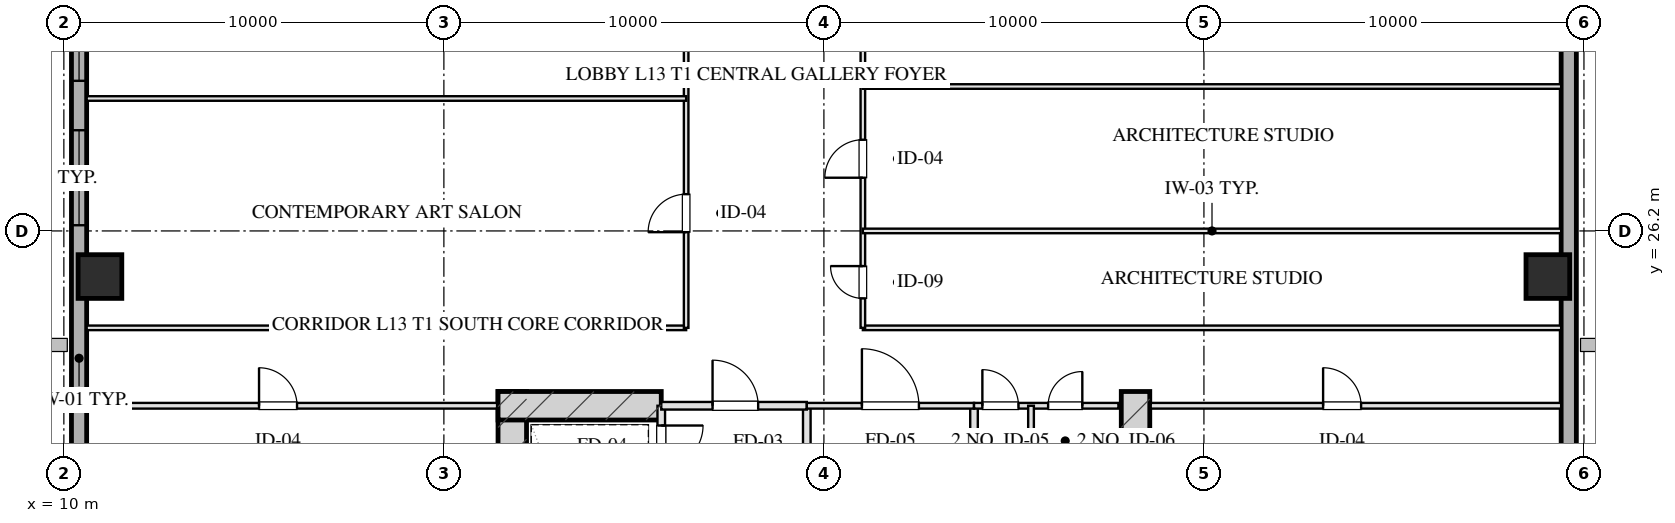
"""IFC4 building model, lengths in metres.
Left out: names, types, materials, properties, quantities, classifications, styles, units other than length and angle.
Written with IfcOpenShell. Run it as: python <this file> out.ifc"""

import sys

from ifc_helpers import new_model, si_unit, direction, frame, frame_2d, origin, origin_2d, place, context, subcontext, project, spatial, rectangle, hollow_rectangle, extrude, element, fill, save


model = new_model("IFC4")
c1 = context("Model", 3, precision=1e-05, world=origin(), true_north=direction((0.0, 1.0)))
c2 = subcontext(c1, "Body", "Model", "MODEL_VIEW")
j1 = project(units=[si_unit("LENGTHUNIT", "METRE"), si_unit("PLANEANGLEUNIT", "RADIAN")], contexts=[c1])
p1 = place(None, origin())
s1 = spatial("IfcSite", under=j1, at=p1, CompositionType="ELEMENT")
p2 = place(p1, origin())
s2 = spatial("IfcBuilding", under=s1, at=p2, CompositionType="ELEMENT")
p3 = place(p2, frame((0.0, 0.0, 57.5)))
s3 = spatial("IfcBuildingStorey", under=s2, at=p3, CompositionType="ELEMENT", Elevation=57.5)
for number, where, z_axis, x_axis in (
    (1, (21.8, 21.975, 0.0), (0.0, 0.0, 1.0), (0.0, -1.0, 0.0)),
    (2, (38.2, 21.975, 0.0), (0.0, 0.0, 1.0), (0.0, -1.0, 0.0)),
):
    element("IfcWall", number, at=place(p3, frame(where, z_axis=z_axis, x_axis=x_axis)), inside=s3, PredefinedType="SHEAR", context=c2, shape_type="SweptSolid", body=[
        extrude(rectangle(XDim=9.63, YDim=0.75, at=frame_2d((4.815, 0.0))), origin(), (0.0, 0.0, 1.0), 3.45),
    ])
p4 = place(p3, frame((21.425, 21.6, 0.0), z_axis=(0.0, 0.0, 1.0), x_axis=(1.0, 0.0, 0.0)))
e3 = element("IfcWall", 3, at=p4, inside=s3, PredefinedType="SHEAR", context=c2, shape_type="SweptSolid", body=[
    extrude(rectangle(XDim=4.295, YDim=0.75, at=frame_2d((2.147, 0.0))), origin(), (0.0, 0.0, 1.0), 3.45),
])
for number, where, z_axis, x_axis in (
    (4, (10.95, 25.0, 0.0), (0.0, 0.0, 1.0), (1.0, 0.0, 0.0)),
    (5, (49.05, 25.0, 0.0), (0.0, 0.0, 1.0), (1.0, 0.0, 0.0)),
):
    element("IfcColumn", number, at=place(p3, frame(where, z_axis=z_axis, x_axis=x_axis)), inside=s3, PredefinedType="COLUMN", context=c2, shape_type="SweptSolid", body=[
        extrude(hollow_rectangle(XDim=1.15, YDim=1.15, WallThickness=0.04, at=origin_2d()), origin(), (0.0, 0.0, 1.0), 3.451),
    ])
p5 = place(p3, frame((10.4, 7.2, 0.0), z_axis=(0.0, 0.0, 1.0), x_axis=(0.0, 1.0, 0.0)))
e6 = element("IfcWall", 6, at=p5, inside=s3, PredefinedType="SOLIDWALL", context=c2, shape_type="SweptSolid", body=[
    extrude(rectangle(XDim=53.6, YDim=0.4, at=frame_2d((26.8, 0.0))), origin(), (0.0, 0.0, 1.0), 2.61),
])
p6 = place(p5, frame((19.15, 0.0, 0.75)))
e7 = element("IfcOpeningElement", 7, at=p6, cuts=e6, PredefinedType="OPENING", context=c2, shape_type="SweptSolid", body=[
    extrude(rectangle(XDim=2.5, YDim=1.46, at=frame_2d((1.25, 0.73))), frame((0.0, 0.21, 0.0), z_axis=(0.0, -1.0, 0.0), x_axis=(1.0, 0.0, 0.0)), (0.0, 0.0, 1.0), 0.42),
])
p7 = place(p5, frame((22.95, 0.0, 0.75)))
e8 = element("IfcOpeningElement", 8, at=p7, cuts=e6, PredefinedType="OPENING", context=c2, shape_type="SweptSolid", body=[
    extrude(rectangle(XDim=2.5, YDim=1.46, at=frame_2d((1.25, 0.73))), frame((0.0, 0.21, 0.0), z_axis=(0.0, -1.0, 0.0), x_axis=(1.0, 0.0, 0.0)), (0.0, 0.0, 1.0), 0.42),
])
p8 = place(p5, frame((32.05, 0.0, 0.0)))
e9 = element("IfcOpeningElement", 9, at=p8, cuts=e6, PredefinedType="OPENING", context=c2, shape_type="SweptSolid", body=[
    extrude(rectangle(XDim=1.1, YDim=2.15, at=frame_2d((0.55, 1.075))), frame((0.0, 0.21, 0.0), z_axis=(0.0, -1.0, 0.0), x_axis=(1.0, 0.0, 0.0)), (0.0, 0.0, 1.0), 0.42),
])
p9 = place(p3, frame((49.6, 60.8, 0.0), z_axis=(0.0, 0.0, 1.0), x_axis=(0.0, -1.0, 0.0)))
e10 = element("IfcWall", 10, at=p9, inside=s3, PredefinedType="SOLIDWALL", context=c2, shape_type="SweptSolid", body=[
    extrude(rectangle(XDim=53.6, YDim=0.4, at=frame_2d((26.8, 0.0))), origin(), (0.0, 0.0, 1.0), 2.61),
])
p10 = place(p9, frame((23.177, 0.0, 0.0)))
e11 = element("IfcOpeningElement", 11, at=p10, cuts=e10, PredefinedType="OPENING", context=c2, shape_type="SweptSolid", body=[
    extrude(rectangle(XDim=1.1, YDim=2.15, at=frame_2d((0.55, 1.075))), frame((0.0, 0.21, 0.0), z_axis=(0.0, -1.0, 0.0), x_axis=(1.0, 0.0, 0.0)), (0.0, 0.0, 1.0), 0.42),
])
p11 = place(p3, frame((25.72, 21.6, 0.0), z_axis=(0.0, 0.0, 1.0), x_axis=(0.0, -1.0, 0.0)))
e12 = element("IfcWall", 12, at=p11, inside=s3, PredefinedType="PARTITIONING", context=c2, shape_type="SweptSolid", body=[
    extrude(rectangle(XDim=1.9, YDim=0.2, at=frame_2d((0.95, 0.0))), origin(), (0.0, 0.0, 1.0), 3.175),
])
p12 = place(p11, frame((0.52, 0.0, 0.0)))
e13 = element("IfcOpeningElement", 13, at=p12, cuts=e12, PredefinedType="OPENING", context=c2, shape_type="SweptSolid", body=[
    extrude(rectangle(XDim=1.1, YDim=2.05, at=frame_2d((0.55, 1.025))), frame((0.0, 0.11, 0.0), z_axis=(0.0, -1.0, 0.0), x_axis=(1.0, 0.0, 0.0)), (0.0, 0.0, 1.0), 0.22),
])
p13 = place(p3, frame((29.55, 21.6, 0.0), z_axis=(0.0, 0.0, 1.0), x_axis=(0.0, -1.0, 0.0)))
e14 = element("IfcWall", 14, at=p13, inside=s3, PredefinedType="PARTITIONING", context=c2, shape_type="SweptSolid", body=[
    extrude(rectangle(XDim=8.43, YDim=0.2, at=frame_2d((4.215, 0.0))), origin(), (0.0, 0.0, 1.0), 3.175),
])
p14 = place(p3, frame((25.72, 21.6, 0.0), z_axis=(0.0, 0.0, 1.0), x_axis=(1.0, 0.0, 0.0)))
e15 = element("IfcWall", 15, at=p14, inside=s3, PredefinedType="PARTITIONING", context=c2, shape_type="SweptSolid", body=[
    extrude(rectangle(XDim=3.83, YDim=0.2, at=frame_2d((1.915, 0.0))), origin(), (0.0, 0.0, 1.0), 3.175),
])
p15 = place(p14, frame((1.35, 0.0, 0.0)))
e16 = element("IfcOpeningElement", 16, at=p15, cuts=e15, PredefinedType="OPENING", context=c2, shape_type="SweptSolid", body=[
    extrude(rectangle(XDim=1.2, YDim=2.05, at=frame_2d((0.6, 1.025))), frame((0.0, 0.11, 0.0), z_axis=(0.0, -1.0, 0.0), x_axis=(1.0, 0.0, 0.0)), (0.0, 0.0, 1.0), 0.22),
])
p16 = place(p3, frame((33.95, 21.6, 0.0), z_axis=(0.0, 0.0, 1.0), x_axis=(0.0, -1.0, 0.0)))
e17 = element("IfcWall", 17, at=p16, inside=s3, PredefinedType="PARTITIONING", context=c2, shape_type="SweptSolid", body=[
    extrude(rectangle(XDim=8.43, YDim=0.2, at=frame_2d((4.215, 0.0))), origin(), (0.0, 0.0, 1.0), 3.175),
])
p17 = place(p3, frame((29.55, 21.6, 0.0), z_axis=(0.0, 0.0, 1.0), x_axis=(1.0, 0.0, 0.0)))
e18 = element("IfcWall", 18, at=p17, inside=s3, PredefinedType="PARTITIONING", context=c2, shape_type="SweptSolid", body=[
    extrude(rectangle(XDim=4.4, YDim=0.15, at=frame_2d((2.2, 0.0))), origin(), (0.0, 0.0, 1.0), 3.175),
])
p18 = place(p17, frame((1.45, 0.0, 0.0)))
e19 = element("IfcOpeningElement", 19, at=p18, cuts=e18, PredefinedType="OPENING", context=c2, shape_type="SweptSolid", body=[
    extrude(rectangle(XDim=1.5, YDim=2.05, at=frame_2d((0.75, 1.025))), frame((0.0, 0.085, 0.0), z_axis=(0.0, -1.0, 0.0), x_axis=(1.0, 0.0, 0.0)), (0.0, 0.0, 1.0), 0.17),
])
p19 = place(p3, frame((33.95, 21.6, 0.0), z_axis=(0.0, 0.0, 1.0), x_axis=(1.0, 0.0, 0.0)))
e20 = element("IfcWall", 20, at=p19, inside=s3, PredefinedType="PARTITIONING", context=c2, shape_type="SweptSolid", body=[
    extrude(rectangle(XDim=3.8, YDim=0.15, at=frame_2d((1.9, 0.0))), origin(), (0.0, 0.0, 1.0), 3.175),
])
p20 = place(p19, frame((0.22, 0.0, 0.0)))
e21 = element("IfcOpeningElement", 21, at=p20, cuts=e20, PredefinedType="OPENING", context=c2, shape_type="SweptSolid", body=[
    extrude(rectangle(XDim=0.95, YDim=2.05, at=frame_2d((0.475, 1.025))), frame((0.0, 0.085, 0.0), z_axis=(0.0, -1.0, 0.0), x_axis=(1.0, 0.0, 0.0)), (0.0, 0.0, 1.0), 0.17),
])
p21 = place(p19, frame((1.95, 0.0, 0.0)))
e22 = element("IfcOpeningElement", 22, at=p21, cuts=e20, PredefinedType="OPENING", context=c2, shape_type="SweptSolid", body=[
    extrude(rectangle(XDim=0.9, YDim=2.05, at=frame_2d((0.45, 1.025))), frame((0.0, 0.085, 0.0), z_axis=(0.0, -1.0, 0.0), x_axis=(1.0, 0.0, 0.0)), (0.0, 0.0, 1.0), 0.17),
])
p22 = place(p3, frame((35.45, 21.6, 0.0), z_axis=(0.0, 0.0, 1.0), x_axis=(0.0, -1.0, 0.0)))
e23 = element("IfcWall", 23, at=p22, inside=s3, PredefinedType="PARTITIONING", context=c2, shape_type="SweptSolid", body=[
    extrude(rectangle(XDim=8.43, YDim=0.15, at=frame_2d((4.215, 0.0))), origin(), (0.0, 0.0, 1.0), 2.815),
])
p23 = place(p22, frame((2.55, 0.0, 0.0)))
e24 = element("IfcOpeningElement", 24, at=p23, cuts=e23, PredefinedType="OPENING", context=c2, shape_type="SweptSolid", body=[
    extrude(rectangle(XDim=0.95, YDim=2.05, at=frame_2d((0.475, 1.025))), frame((0.0, 0.085, 0.0), z_axis=(0.0, -1.0, 0.0), x_axis=(1.0, 0.0, 0.0)), (0.0, 0.0, 1.0), 0.17),
])
p24 = place(p22, frame((5.6, 0.0, 0.0)))
e25 = element("IfcOpeningElement", 25, at=p24, cuts=e23, PredefinedType="OPENING", context=c2, shape_type="SweptSolid", body=[
    extrude(rectangle(XDim=0.9, YDim=2.05, at=frame_2d((0.45, 1.025))), frame((0.0, 0.085, 0.0), z_axis=(0.0, -1.0, 0.0), x_axis=(1.0, 0.0, 0.0)), (0.0, 0.0, 1.0), 0.17),
])
p25 = place(p3, frame((10.6, 21.6, 0.0), z_axis=(0.0, 0.0, 1.0), x_axis=(1.0, 0.0, 0.0)))
e26 = element("IfcWall", 26, at=p25, inside=s3, PredefinedType="PARTITIONING", context=c2, shape_type="SweptSolid", body=[
    extrude(rectangle(XDim=10.8, YDim=0.15, at=frame_2d((5.4, 0.0))), origin(), (0.0, 0.0, 1.0), 3.175),
])
p26 = place(p25, frame((4.536, 0.0, 0.0)))
e27 = element("IfcOpeningElement", 27, at=p26, cuts=e26, PredefinedType="OPENING", context=c2, shape_type="SweptSolid", body=[
    extrude(rectangle(XDim=1.0, YDim=2.05, at=frame_2d((0.5, 1.025))), frame((0.0, 0.085, 0.0), z_axis=(0.0, -1.0, 0.0), x_axis=(1.0, 0.0, 0.0)), (0.0, 0.0, 1.0), 0.17),
])
p27 = place(p3, frame((38.6, 21.6, 0.0), z_axis=(0.0, 0.0, 1.0), x_axis=(1.0, 0.0, 0.0)))
e28 = element("IfcWall", 28, at=p27, inside=s3, PredefinedType="PARTITIONING", context=c2, shape_type="SweptSolid", body=[
    extrude(rectangle(XDim=10.8, YDim=0.15, at=frame_2d((5.4, 0.0))), origin(), (0.0, 0.0, 1.0), 3.175),
])
p28 = place(p27, frame((4.536, 0.0, 0.0)))
e29 = element("IfcOpeningElement", 29, at=p28, cuts=e28, PredefinedType="OPENING", context=c2, shape_type="SweptSolid", body=[
    extrude(rectangle(XDim=1.0, YDim=2.05, at=frame_2d((0.5, 1.025))), frame((0.0, 0.085, 0.0), z_axis=(0.0, -1.0, 0.0), x_axis=(1.0, 0.0, 0.0)), (0.0, 0.0, 1.0), 0.17),
])
p29 = place(p3, frame((10.6, 23.65, 0.0), z_axis=(0.0, 0.0, 1.0), x_axis=(1.0, 0.0, 0.0)))
e30 = element("IfcWall", 30, at=p29, inside=s3, PredefinedType="PARTITIONING", context=c2, shape_type="SweptSolid", body=[
    extrude(rectangle(XDim=15.775, YDim=0.12, at=frame_2d((7.887, 0.0))), origin(), (0.0, 0.0, 1.0), 3.175),
])
p30 = place(p3, frame((31.025, 23.65, 0.0), z_axis=(0.0, 0.0, 1.0), x_axis=(1.0, 0.0, 0.0)))
e31 = element("IfcWall", 31, at=p30, inside=s3, PredefinedType="PARTITIONING", context=c2, shape_type="SweptSolid", body=[
    extrude(rectangle(XDim=18.375, YDim=0.12, at=frame_2d((9.188, 0.0))), origin(), (0.0, 0.0, 1.0), 3.175),
])
p31 = place(p3, frame((26.375, 23.65, 0.0), z_axis=(0.0, 0.0, 1.0), x_axis=(0.0, 1.0, 0.0)))
e32 = element("IfcWall", 32, at=p31, inside=s3, PredefinedType="PARTITIONING", context=c2, shape_type="SweptSolid", body=[
    extrude(rectangle(XDim=20.7, YDim=0.12, at=frame_2d((10.35, 0.0))), origin(), (0.0, 0.0, 1.0), 3.175),
])
p32 = place(p31, frame((2.518, 0.0, 0.0)))
e33 = element("IfcOpeningElement", 33, at=p32, cuts=e32, PredefinedType="OPENING", context=c2, shape_type="SweptSolid", body=[
    extrude(rectangle(XDim=1.0, YDim=2.05, at=frame_2d((0.5, 1.025))), frame((0.0, 0.07, 0.0), z_axis=(0.0, -1.0, 0.0), x_axis=(1.0, 0.0, 0.0)), (0.0, 0.0, 1.0), 0.14),
])
p33 = place(p31, frame((9.692, 0.0, 0.0)))
e34 = element("IfcOpeningElement", 34, at=p33, cuts=e32, PredefinedType="OPENING", context=c2, shape_type="SweptSolid", body=[
    extrude(rectangle(XDim=1.0, YDim=2.05, at=frame_2d((0.5, 1.025))), frame((0.0, 0.07, 0.0), z_axis=(0.0, -1.0, 0.0), x_axis=(1.0, 0.0, 0.0)), (0.0, 0.0, 1.0), 0.14),
])
p34 = place(p31, frame((17.025, 0.0, 0.0)))
e35 = element("IfcOpeningElement", 35, at=p34, cuts=e32, PredefinedType="OPENING", context=c2, shape_type="SweptSolid", body=[
    extrude(rectangle(XDim=1.0, YDim=2.05, at=frame_2d((0.5, 1.025))), frame((0.0, 0.07, 0.0), z_axis=(0.0, -1.0, 0.0), x_axis=(1.0, 0.0, 0.0)), (0.0, 0.0, 1.0), 0.14),
])
p35 = place(p3, frame((31.025, 23.65, 0.0), z_axis=(0.0, 0.0, 1.0), x_axis=(0.0, 1.0, 0.0)))
e36 = element("IfcWall", 36, at=p35, inside=s3, PredefinedType="PARTITIONING", context=c2, shape_type="SweptSolid", body=[
    extrude(rectangle(XDim=20.7, YDim=0.12, at=frame_2d((10.35, 0.0))), origin(), (0.0, 0.0, 1.0), 3.175),
])
p36 = place(p35, frame((0.775, 0.0, 0.0)))
e37 = element("IfcOpeningElement", 37, at=p36, cuts=e36, PredefinedType="OPENING", context=c2, shape_type="SweptSolid", body=[
    extrude(rectangle(XDim=0.85, YDim=2.05, at=frame_2d((0.425, 1.025))), frame((0.0, 0.07, 0.0), z_axis=(0.0, -1.0, 0.0), x_axis=(1.0, 0.0, 0.0)), (0.0, 0.0, 1.0), 0.14),
])
p37 = place(p35, frame((3.95, 0.0, 0.0)))
e38 = element("IfcOpeningElement", 38, at=p37, cuts=e36, PredefinedType="OPENING", context=c2, shape_type="SweptSolid", body=[
    extrude(rectangle(XDim=1.0, YDim=2.05, at=frame_2d((0.5, 1.025))), frame((0.0, 0.07, 0.0), z_axis=(0.0, -1.0, 0.0), x_axis=(1.0, 0.0, 0.0)), (0.0, 0.0, 1.0), 0.14),
])
p38 = place(p35, frame((8.455, 0.0, 0.0)))
e39 = element("IfcOpeningElement", 39, at=p38, cuts=e36, PredefinedType="OPENING", context=c2, shape_type="SweptSolid", body=[
    extrude(rectangle(XDim=1.05, YDim=2.05, at=frame_2d((0.525, 1.025))), frame((0.0, 0.07, 0.0), z_axis=(0.0, -1.0, 0.0), x_axis=(1.0, 0.0, 0.0)), (0.0, 0.0, 1.0), 0.14),
])
p39 = place(p35, frame((12.923, 0.0, 0.0)))
e40 = element("IfcOpeningElement", 40, at=p39, cuts=e36, PredefinedType="OPENING", context=c2, shape_type="SweptSolid", body=[
    extrude(rectangle(XDim=1.0, YDim=2.05, at=frame_2d((0.5, 1.025))), frame((0.0, 0.07, 0.0), z_axis=(0.0, -1.0, 0.0), x_axis=(1.0, 0.0, 0.0)), (0.0, 0.0, 1.0), 0.14),
])
p40 = place(p35, frame((16.338, 0.0, 0.0)))
e41 = element("IfcOpeningElement", 41, at=p40, cuts=e36, PredefinedType="OPENING", context=c2, shape_type="SweptSolid", body=[
    extrude(rectangle(XDim=1.0, YDim=2.05, at=frame_2d((0.5, 1.025))), frame((0.0, 0.07, 0.0), z_axis=(0.0, -1.0, 0.0), x_axis=(1.0, 0.0, 0.0)), (0.0, 0.0, 1.0), 0.14),
])
p41 = place(p35, frame((19.045, 0.0, 0.0)))
e42 = element("IfcOpeningElement", 42, at=p41, cuts=e36, PredefinedType="OPENING", context=c2, shape_type="SweptSolid", body=[
    extrude(rectangle(XDim=1.0, YDim=2.05, at=frame_2d((0.5, 1.025))), frame((0.0, 0.07, 0.0), z_axis=(0.0, -1.0, 0.0), x_axis=(1.0, 0.0, 0.0)), (0.0, 0.0, 1.0), 0.14),
])
p42 = place(p3, frame((10.6, 29.685, 0.0), z_axis=(0.0, 0.0, 1.0), x_axis=(1.0, 0.0, 0.0)))
e43 = element("IfcWall", 43, at=p42, inside=s3, PredefinedType="PARTITIONING", context=c2, shape_type="SweptSolid", body=[
    extrude(rectangle(XDim=15.775, YDim=0.12, at=frame_2d((7.887, 0.0))), origin(), (0.0, 0.0, 1.0), 3.175),
])
for number, where, z_axis, x_axis in (
    (44, (31.025, 26.2, 0.0), (0.0, 0.0, 1.0), (1.0, 0.0, 0.0)),
    (45, (31.025, 30.0, 0.0), (0.0, 0.0, 1.0), (1.0, 0.0, 0.0)),
):
    element("IfcWall", number, at=place(p3, frame(where, z_axis=z_axis, x_axis=x_axis)), inside=s3, PredefinedType="PARTITIONING", context=c2, shape_type="SweptSolid", body=[
        extrude(rectangle(XDim=18.375, YDim=0.12, at=frame_2d((9.188, 0.0))), origin(), (0.0, 0.0, 1.0), 3.175),
    ])
p43 = place(p6, origin())
e46 = element("IfcWindow", 46, at=p43, inside=s3, PartitioningType="TRIPLE_PANEL_VERTICAL", PredefinedType="WINDOW", context=c2, shape_type="SweptSolid", body=[
    extrude(rectangle(XDim=2.5, YDim=1.46, at=frame_2d((1.25, 0.73))), frame((0.0, 0.03, 0.0), z_axis=(0.0, -1.0, 0.0), x_axis=(1.0, 0.0, 0.0)), (0.0, 0.0, 1.0), 0.06),
])
fill(e7, e46)
p44 = place(p7, origin())
e47 = element("IfcWindow", 47, at=p44, inside=s3, PartitioningType="TRIPLE_PANEL_VERTICAL", PredefinedType="WINDOW", context=c2, shape_type="SweptSolid", body=[
    extrude(rectangle(XDim=2.5, YDim=1.46, at=frame_2d((1.25, 0.73))), frame((0.0, 0.03, 0.0), z_axis=(0.0, -1.0, 0.0), x_axis=(1.0, 0.0, 0.0)), (0.0, 0.0, 1.0), 0.06),
])
fill(e8, e47)
p45 = place(p12, origin())
e48 = element("IfcDoor", 48, at=p45, inside=s3, OperationType="SINGLE_SWING_LEFT", PredefinedType="DOOR", context=c2, shape_type="SweptSolid", body=[
    extrude(rectangle(XDim=1.1, YDim=2.05, at=frame_2d((0.55, 1.025))), frame((0.0, 0.025, 0.0), z_axis=(0.0, -1.0, 0.0), x_axis=(1.0, 0.0, 0.0)), (0.0, 0.0, 1.0), 0.05),
])
fill(e13, e48)
p46 = place(p15, origin())
e49 = element("IfcDoor", 49, at=p46, inside=s3, OperationType="SINGLE_SWING_LEFT", PredefinedType="DOOR", context=c2, shape_type="SweptSolid", body=[
    extrude(rectangle(XDim=1.2, YDim=2.05, at=frame_2d((0.6, 1.025))), frame((0.0, 0.025, 0.0), z_axis=(0.0, -1.0, 0.0), x_axis=(1.0, 0.0, 0.0)), (0.0, 0.0, 1.0), 0.05),
])
fill(e16, e49)
p47 = place(p18, origin())
e50 = element("IfcDoor", 50, at=p47, inside=s3, OperationType="SINGLE_SWING_LEFT", PredefinedType="DOOR", context=c2, shape_type="SweptSolid", body=[
    extrude(rectangle(XDim=1.5, YDim=2.05, at=frame_2d((0.75, 1.025))), frame((0.0, 0.025, 0.0), z_axis=(0.0, -1.0, 0.0), x_axis=(1.0, 0.0, 0.0)), (0.0, 0.0, 1.0), 0.05),
])
fill(e19, e50)
p48 = place(p20, origin())
e51 = element("IfcDoor", 51, at=p48, inside=s3, OperationType="SINGLE_SWING_LEFT", PredefinedType="DOOR", context=c2, shape_type="SweptSolid", body=[
    extrude(rectangle(XDim=0.95, YDim=2.05, at=frame_2d((0.475, 1.025))), frame((0.0, 0.025, 0.0), z_axis=(0.0, -1.0, 0.0), x_axis=(1.0, 0.0, 0.0)), (0.0, 0.0, 1.0), 0.05),
])
fill(e21, e51)
p49 = place(p21, origin())
e52 = element("IfcDoor", 52, at=p49, inside=s3, OperationType="SINGLE_SWING_RIGHT", PredefinedType="DOOR", context=c2, shape_type="SweptSolid", body=[
    extrude(rectangle(XDim=0.9, YDim=2.05, at=frame_2d((0.45, 1.025))), frame((0.0, 0.025, 0.0), z_axis=(0.0, -1.0, 0.0), x_axis=(1.0, 0.0, 0.0)), (0.0, 0.0, 1.0), 0.05),
])
fill(e22, e52)
p50 = place(p26, origin())
e53 = element("IfcDoor", 53, at=p50, inside=s3, OperationType="SINGLE_SWING_LEFT", PredefinedType="DOOR", context=c2, shape_type="SweptSolid", body=[
    extrude(rectangle(XDim=1.0, YDim=2.05, at=frame_2d((0.5, 1.025))), frame((0.0, 0.025, 0.0), z_axis=(0.0, -1.0, 0.0), x_axis=(1.0, 0.0, 0.0)), (0.0, 0.0, 1.0), 0.05),
])
fill(e27, e53)
p51 = place(p28, origin())
e54 = element("IfcDoor", 54, at=p51, inside=s3, OperationType="SINGLE_SWING_LEFT", PredefinedType="DOOR", context=c2, shape_type="SweptSolid", body=[
    extrude(rectangle(XDim=1.0, YDim=2.05, at=frame_2d((0.5, 1.025))), frame((0.0, 0.025, 0.0), z_axis=(0.0, -1.0, 0.0), x_axis=(1.0, 0.0, 0.0)), (0.0, 0.0, 1.0), 0.05),
])
fill(e29, e54)
p52 = place(p32, origin())
e55 = element("IfcDoor", 55, at=p52, inside=s3, OperationType="SINGLE_SWING_LEFT", PredefinedType="DOOR", context=c2, shape_type="SweptSolid", body=[
    extrude(rectangle(XDim=1.0, YDim=2.05, at=frame_2d((0.5, 1.025))), frame((0.0, 0.025, 0.0), z_axis=(0.0, -1.0, 0.0), x_axis=(1.0, 0.0, 0.0)), (0.0, 0.0, 1.0), 0.05),
])
fill(e33, e55)
p53 = place(p36, origin())
e56 = element("IfcDoor", 56, at=p53, inside=s3, OperationType="SINGLE_SWING_RIGHT", PredefinedType="DOOR", context=c2, shape_type="SweptSolid", body=[
    extrude(rectangle(XDim=0.85, YDim=2.05, at=frame_2d((0.425, 1.025))), frame((0.0, 0.025, 0.0), z_axis=(0.0, -1.0, 0.0), x_axis=(1.0, 0.0, 0.0)), (0.0, 0.0, 1.0), 0.05),
])
fill(e37, e56)
p54 = place(p37, origin())
e57 = element("IfcDoor", 57, at=p54, inside=s3, OperationType="SINGLE_SWING_LEFT", PredefinedType="DOOR", context=c2, shape_type="SweptSolid", body=[
    extrude(rectangle(XDim=1.0, YDim=2.05, at=frame_2d((0.5, 1.025))), frame((0.0, 0.025, 0.0), z_axis=(0.0, -1.0, 0.0), x_axis=(1.0, 0.0, 0.0)), (0.0, 0.0, 1.0), 0.05),
])
fill(e38, e57)
save(model, sys.argv[1])
